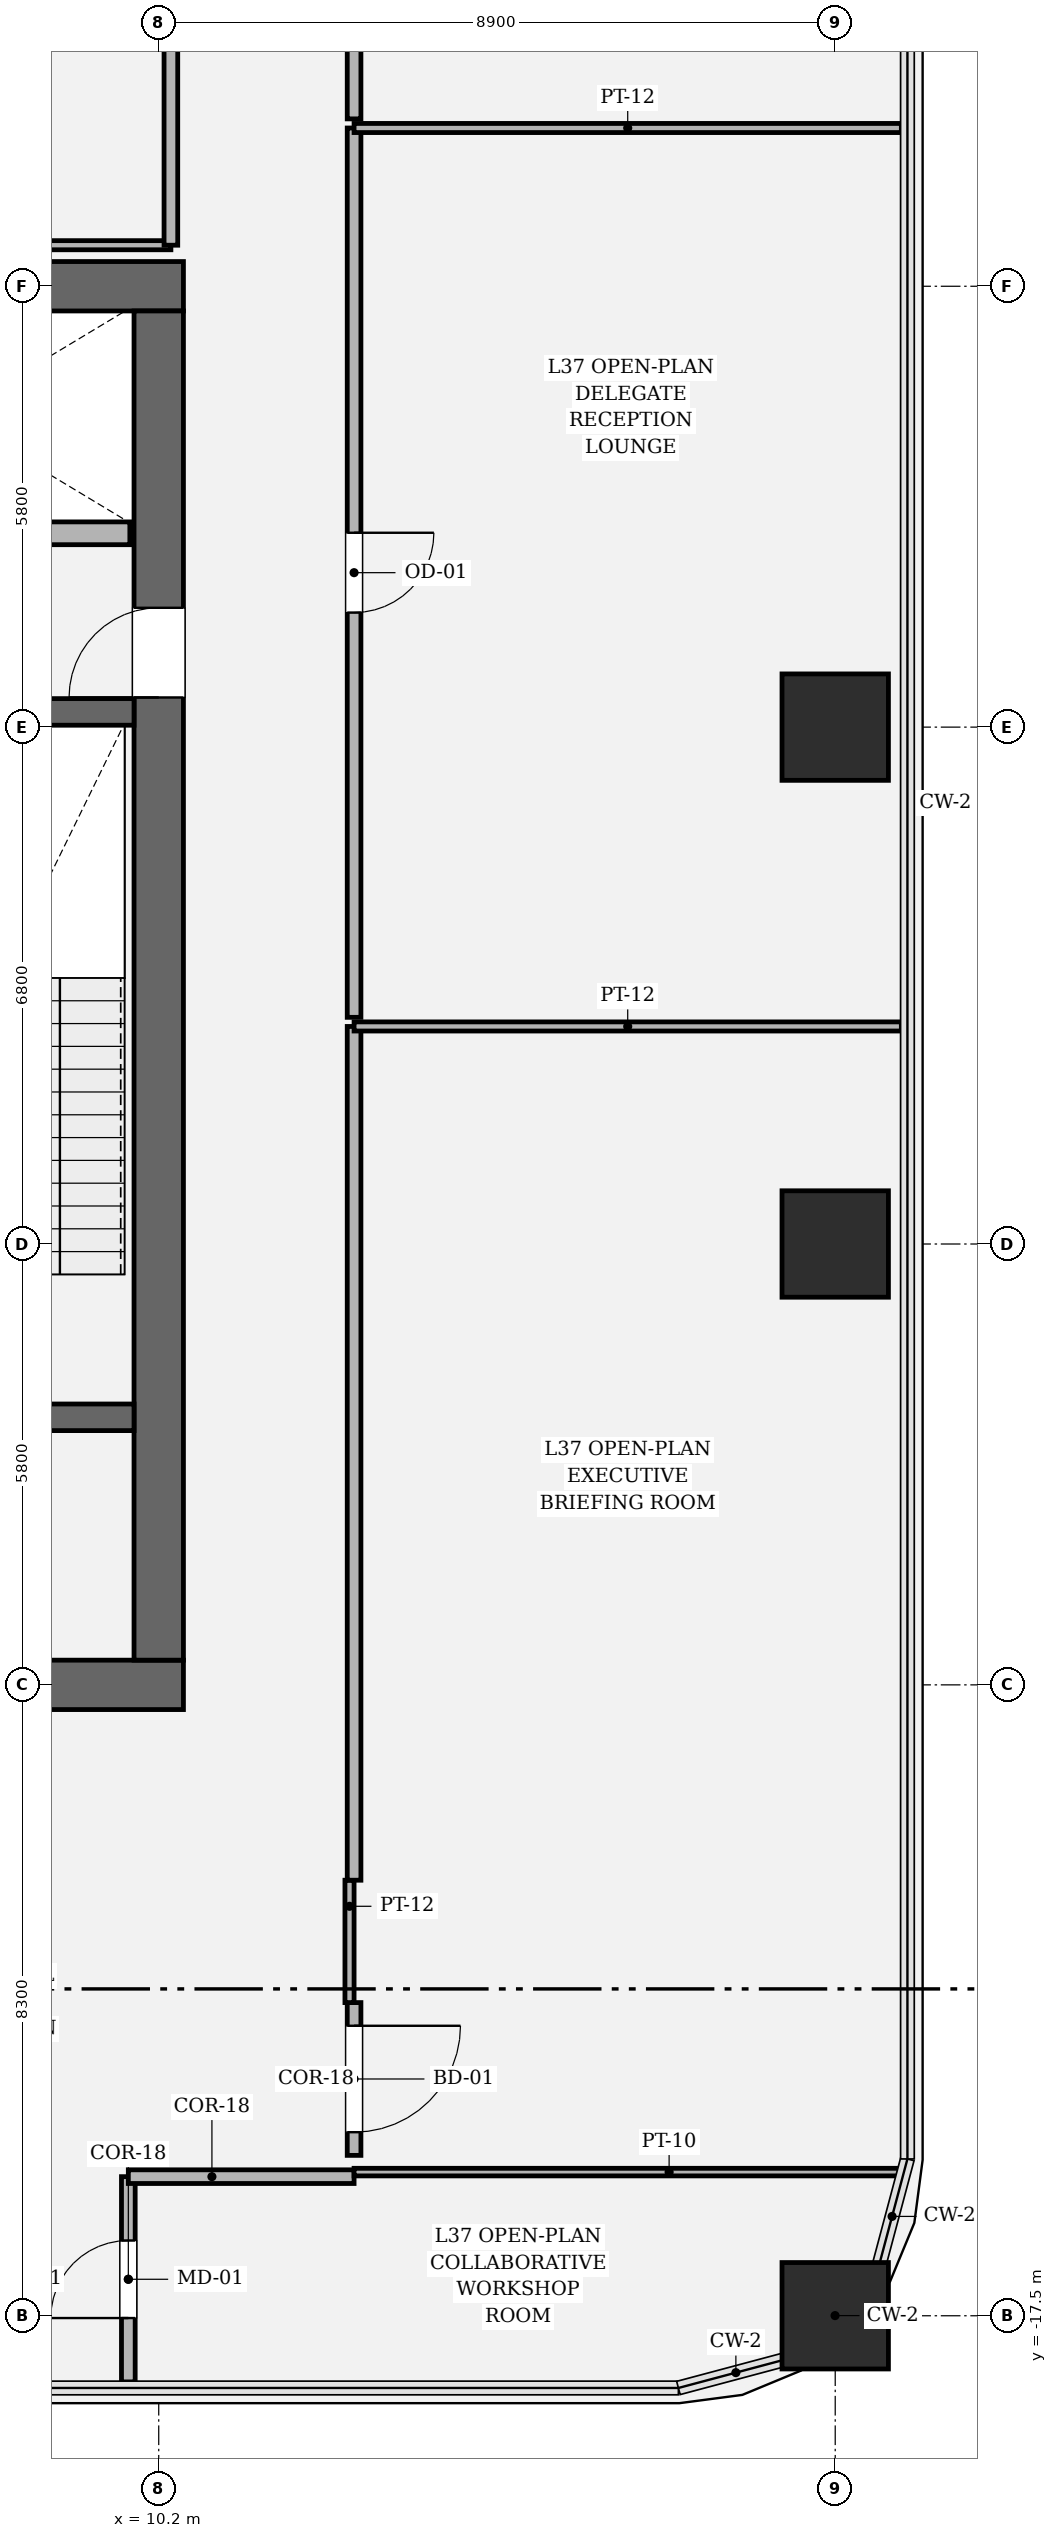
"""IFC4 building model, lengths in metres.
Left out: names, types, materials, properties, quantities, classifications, styles, units other than length and angle.
Written with IfcOpenShell. Run it as: python <this file> out.ifc"""

import sys

from ifc_helpers import new_model, si_unit, direction, frame, frame_2d, origin, origin_2d, place, context, subcontext, project, spatial, rectangle, hollow_rectangle, extrude, element, fill, save


model = new_model("IFC4")
c1 = context("Model", 3, precision=1e-05, world=origin(), true_north=direction((0.0, 1.0)))
c2 = subcontext(c1, "Body", "Model", "MODEL_VIEW")
j1 = project(units=[si_unit("LENGTHUNIT", "METRE"), si_unit("PLANEANGLEUNIT", "RADIAN")], contexts=[c1])
p1 = place(None, origin())
s1 = spatial("IfcSite", under=j1, at=p1, CompositionType="ELEMENT")
p2 = place(p1, origin())
s2 = spatial("IfcBuilding", under=s1, at=p2, CompositionType="ELEMENT")
p3 = place(p2, frame((0.0, 0.0, 160.05)))
s3 = spatial("IfcBuildingStorey", under=s2, at=p3, CompositionType="ELEMENT", Elevation=160.05)
p4 = place(p3, frame((10.525, -9.2, 0.0), z_axis=(0.0, 0.0, 1.0), x_axis=(-1.0, 0.0, 0.0)))
e1 = element("IfcWall", 1, at=p4, inside=s3, PredefinedType="SHEAR", context=c2, shape_type="SweptSolid", body=[
    extrude(rectangle(XDim=21.05, YDim=0.65, at=frame_2d((10.525, 0.0))), origin(), (0.0, 0.0, 1.0), 4.05),
])
p5 = place(p4, frame((2.8, 0.0, 0.0)))
e2 = element("IfcOpeningElement", 2, at=p5, cuts=e1, PredefinedType="OPENING", context=c2, shape_type="SweptSolid", body=[
    extrude(rectangle(XDim=1.25, YDim=2.25, at=frame_2d((0.625, 1.125))), frame((0.0, 0.335, 0.0), z_axis=(0.0, -1.0, 0.0), x_axis=(1.0, 0.0, 0.0)), (0.0, 0.0, 1.0), 0.67),
])
p6 = place(p4, frame((17.0, 0.0, 0.0)))
e3 = element("IfcOpeningElement", 3, at=p6, cuts=e1, PredefinedType="OPENING", context=c2, shape_type="SweptSolid", body=[
    extrude(rectangle(XDim=1.25, YDim=2.25, at=frame_2d((0.625, 1.125))), frame((0.0, 0.335, 0.0), z_axis=(0.0, -1.0, 0.0), x_axis=(1.0, 0.0, 0.0)), (0.0, 0.0, 1.0), 0.67),
])
p7 = place(p3, frame((-10.525, 9.2, 0.0), z_axis=(0.0, 0.0, 1.0), x_axis=(1.0, 0.0, 0.0)))
e4 = element("IfcWall", 4, at=p7, inside=s3, PredefinedType="SHEAR", context=c2, shape_type="SweptSolid", body=[
    extrude(rectangle(XDim=21.05, YDim=0.65, at=frame_2d((10.525, 0.0))), origin(), (0.0, 0.0, 1.0), 4.05),
])
p8 = place(p3, frame((10.2, 8.875, 0.0), z_axis=(0.0, 0.0, 1.0), x_axis=(0.0, -1.0, 0.0)))
e5 = element("IfcWall", 5, at=p8, inside=s3, PredefinedType="SHEAR", context=c2, shape_type="SweptSolid", body=[
    extrude(rectangle(XDim=17.75, YDim=0.65, at=frame_2d((8.875, 0.0))), origin(), (0.0, 0.0, 1.0), 4.05),
])
p9 = place(p8, frame((3.905, 0.0, 0.0)))
e6 = element("IfcOpeningElement", 6, at=p9, cuts=e5, PredefinedType="OPENING", context=c2, shape_type="SweptSolid", body=[
    extrude(rectangle(XDim=1.18, YDim=2.2, at=frame_2d((0.59, 1.1))), frame((0.0, 0.335, 0.0), z_axis=(0.0, -1.0, 0.0), x_axis=(1.0, 0.0, 0.0)), (0.0, 0.0, 1.0), 0.67),
])
p10 = place(p3, frame((4.65, -5.68, 0.0), z_axis=(0.0, 0.0, 1.0), x_axis=(1.0, 0.0, 0.0)))
e7 = element("IfcWall", 7, at=p10, inside=s3, PredefinedType="SOLIDWALL", context=c2, shape_type="SweptSolid", body=[
    extrude(rectangle(XDim=5.225, YDim=0.35, at=frame_2d((2.613, 0.0))), origin(), (0.0, 0.0, 1.0), 4.05),
])
p11 = place(p10, frame((2.71, 0.0, 0.0)))
e8 = element("IfcOpeningElement", 8, at=p11, cuts=e7, PredefinedType="OPENING", context=c2, shape_type="SweptSolid", body=[
    extrude(rectangle(XDim=1.18, YDim=2.2, at=frame_2d((0.59, 1.1))), frame((0.0, 0.185, 0.0), z_axis=(0.0, -1.0, 0.0), x_axis=(1.0, 0.0, 0.0)), (0.0, 0.0, 1.0), 0.37),
])
p12 = place(p3, frame((4.65, 3.6, 0.0), z_axis=(0.0, 0.0, 1.0), x_axis=(1.0, 0.0, 0.0)))
e9 = element("IfcWall", 9, at=p12, inside=s3, PredefinedType="SOLIDWALL", context=c2, shape_type="SweptSolid", body=[
    extrude(rectangle(XDim=5.225, YDim=0.35, at=frame_2d((2.613, 0.0))), origin(), (0.0, 0.0, 1.0), 4.05),
])
for number, where, z_axis, x_axis in (
    (10, (19.1, -17.5, 0.0), (0.0, 0.0, 1.0), (1.0, 0.0, 0.0)),
    (11, (19.1, -3.4, 0.0), (0.0, 0.0, 1.0), (1.0, 0.0, 0.0)),
    (12, (19.1, 3.4, 0.0), (0.0, 0.0, 1.0), (1.0, 0.0, 0.0)),
):
    element("IfcColumn", number, at=place(p3, frame(where, z_axis=z_axis, x_axis=x_axis)), inside=s3, PredefinedType="COLUMN", context=c2, shape_type="SweptSolid", body=[
        extrude(hollow_rectangle(XDim=1.4, YDim=1.4, WallThickness=0.042, at=origin_2d()), origin(), (0.0, 0.0, 1.0), 4.05),
    ])
p13 = place(p3, frame((5.06, 5.95, 0.0), z_axis=(0.0, 0.0, 1.0), x_axis=(1.0, 0.0, 0.0)))
e13 = element("IfcWall", 13, at=p13, inside=s3, PredefinedType="SOLIDWALL", context=c2, shape_type="SweptSolid", body=[
    extrude(rectangle(XDim=4.76, YDim=0.3, at=frame_2d((2.38, 0.0))), origin(), (0.0, 0.0, 1.0), 3.83),
])
p14 = place(p3, frame((9.8, -18.37, 0.0), z_axis=(0.0, 0.0, 1.0), x_axis=(0.0, 1.0, 0.0)))
e14 = element("IfcWall", 14, at=p14, inside=s3, PredefinedType="PARTITIONING", context=c2, shape_type="SweptSolid", body=[
    extrude(rectangle(XDim=2.7, YDim=0.18, at=frame_2d((1.35, 0.0))), origin(), (0.0, 0.0, 1.0), 3.174),
])
p15 = place(p14, frame((0.84, 0.0, 0.0)))
e15 = element("IfcOpeningElement", 15, at=p15, cuts=e14, PredefinedType="OPENING", context=c2, shape_type="SweptSolid", body=[
    extrude(rectangle(XDim=1.02, YDim=2.2, at=frame_2d((0.51, 1.1))), frame((0.0, 0.1, 0.0), z_axis=(0.0, -1.0, 0.0), x_axis=(1.0, 0.0, 0.0)), (0.0, 0.0, 1.0), 0.2),
])
p16 = place(p3, frame((9.8, -15.67, 0.0), z_axis=(0.0, 0.0, 1.0), x_axis=(1.0, 0.0, 0.0)))
e16 = element("IfcWall", 16, at=p16, inside=s3, PredefinedType="PARTITIONING", context=c2, shape_type="SweptSolid", body=[
    extrude(rectangle(XDim=2.97, YDim=0.18, at=frame_2d((1.485, 0.0))), origin(), (0.0, 0.0, 1.0), 3.174),
])
p17 = place(p3, frame((12.77, -15.61, 0.0), z_axis=(0.0, 0.0, 1.0), x_axis=(1.0, 0.0, 0.0)))
e17 = element("IfcWall", 17, at=p17, inside=s3, PredefinedType="PARTITIONING", context=c2, shape_type="SweptSolid", body=[
    extrude(rectangle(XDim=7.177, YDim=0.1, at=frame_2d((3.588, 0.0))), origin(), (0.0, 0.0, 1.0), 3.174),
])
p18 = place(p3, frame((12.77, -15.39, 0.0), z_axis=(0.0, 0.0, 1.0), x_axis=(0.0, 1.0, 0.0)))
e18 = element("IfcWall", 18, at=p18, inside=s3, PredefinedType="PARTITIONING", context=c2, shape_type="SweptSolid", body=[
    extrude(rectangle(XDim=2.01, YDim=0.18, at=frame_2d((1.005, 0.0))), origin(), (0.0, 0.0, 1.0), 3.424),
])
p19 = place(p18, frame((0.305, 0.0, 0.0)))
e19 = element("IfcOpeningElement", 19, at=p19, cuts=e18, PredefinedType="OPENING", context=c2, shape_type="SweptSolid", body=[
    extrude(rectangle(XDim=1.4, YDim=2.25, at=frame_2d((0.7, 1.125))), frame((0.0, 0.1, 0.0), z_axis=(0.0, -1.0, 0.0), x_axis=(1.0, 0.0, 0.0)), (0.0, 0.0, 1.0), 0.2),
])
p20 = place(p3, frame((12.71, -13.38, 0.0), z_axis=(0.0, 0.0, 1.0), x_axis=(0.0, 1.0, 0.0)))
e20 = element("IfcWall", 20, at=p20, inside=s3, PredefinedType="PARTITIONING", context=c2, shape_type="SweptSolid", body=[
    extrude(rectangle(XDim=1.61, YDim=0.12, at=frame_2d((0.805, 0.0))), origin(), (0.0, 0.0, 1.0), 3.424),
])
p21 = place(p3, frame((12.77, -11.77, 0.0), z_axis=(0.0, 0.0, 1.0), x_axis=(0.0, 1.0, 0.0)))
e21 = element("IfcWall", 21, at=p21, inside=s3, PredefinedType="PARTITIONING", context=c2, shape_type="SweptSolid", body=[
    extrude(rectangle(XDim=11.232, YDim=0.18, at=frame_2d((5.616, 0.0))), origin(), (0.0, 0.0, 1.0), 3.174),
])
p22 = place(p3, frame((12.77, -0.538, 0.0), z_axis=(0.0, 0.0, 1.0), x_axis=(1.0, 0.0, 0.0)))
e22 = element("IfcWall", 22, at=p22, inside=s3, PredefinedType="PARTITIONING", context=c2, shape_type="SweptSolid", body=[
    extrude(rectangle(XDim=7.2, YDim=0.12, at=frame_2d((3.6, 0.0))), origin(), (0.0, 0.0, 1.0), 3.174),
])
p23 = place(p3, frame((12.77, -0.418, 0.0), z_axis=(0.0, 0.0, 1.0), x_axis=(0.0, 1.0, 0.0)))
e23 = element("IfcWall", 23, at=p23, inside=s3, PredefinedType="PARTITIONING", context=c2, shape_type="SweptSolid", body=[
    extrude(rectangle(XDim=11.7, YDim=0.18, at=frame_2d((5.85, 0.0))), origin(), (0.0, 0.0, 1.0), 3.174),
])
p24 = place(p23, frame((5.325, 0.0, 0.0)))
e24 = element("IfcOpeningElement", 24, at=p24, cuts=e23, PredefinedType="OPENING", context=c2, shape_type="SweptSolid", body=[
    extrude(rectangle(XDim=1.05, YDim=2.2, at=frame_2d((0.525, 1.1))), frame((0.0, 0.1, 0.0), z_axis=(0.0, -1.0, 0.0), x_axis=(1.0, 0.0, 0.0)), (0.0, 0.0, 1.0), 0.2),
])
p25 = place(p3, frame((12.77, 11.282, 0.0), z_axis=(0.0, 0.0, 1.0), x_axis=(1.0, 0.0, 0.0)))
e25 = element("IfcWall", 25, at=p25, inside=s3, PredefinedType="PARTITIONING", context=c2, shape_type="SweptSolid", body=[
    extrude(rectangle(XDim=7.2, YDim=0.12, at=frame_2d((3.6, 0.0))), origin(), (0.0, 0.0, 1.0), 3.174),
])
p26 = place(p3, frame((10.36, 9.74, 0.0), z_axis=(0.0, 0.0, 1.0), x_axis=(-1.0, 0.0, 0.0)))
e26 = element("IfcWall", 26, at=p26, inside=s3, PredefinedType="PARTITIONING", context=c2, shape_type="SweptSolid", body=[
    extrude(rectangle(XDim=7.366, YDim=0.12, at=frame_2d((3.683, 0.0))), origin(), (0.0, 0.0, 1.0), 3.174),
])
p27 = place(p3, frame((10.36, 23.17, 0.0), z_axis=(0.0, 0.0, 1.0), x_axis=(0.0, -1.0, 0.0)))
e27 = element("IfcWall", 27, at=p27, inside=s3, PredefinedType="PARTITIONING", context=c2, shape_type="SweptSolid", body=[
    extrude(rectangle(XDim=13.43, YDim=0.18, at=frame_2d((6.715, 0.0))), origin(), (0.0, 0.0, 1.0), 2.544),
])
p28 = place(p27, frame((6.015, 0.0, 0.0)))
e28 = element("IfcOpeningElement", 28, at=p28, cuts=e27, PredefinedType="OPENING", context=c2, shape_type="SweptSolid", body=[
    extrude(rectangle(XDim=1.4, YDim=2.25, at=frame_2d((0.7, 1.125))), frame((0.0, 0.1, 0.0), z_axis=(0.0, -1.0, 0.0), x_axis=(1.0, 0.0, 0.0)), (0.0, 0.0, 1.0), 0.2),
])
p29 = place(p3, frame((12.77, 11.402, 0.0), z_axis=(0.0, 0.0, 1.0), x_axis=(0.0, 1.0, 0.0)))
e29 = element("IfcWall", 29, at=p29, inside=s3, PredefinedType="PARTITIONING", context=c2, shape_type="SweptSolid", body=[
    extrude(rectangle(XDim=11.768, YDim=0.18, at=frame_2d((5.884, 0.0))), origin(), (0.0, 0.0, 1.0), 2.544),
])
p30 = place(p29, frame((5.184, 0.0, 0.0)))
e30 = element("IfcOpeningElement", 30, at=p30, cuts=e29, PredefinedType="OPENING", context=c2, shape_type="SweptSolid", body=[
    extrude(rectangle(XDim=1.4, YDim=2.25, at=frame_2d((0.7, 1.125))), frame((0.0, 0.1, 0.0), z_axis=(0.0, -1.0, 0.0), x_axis=(1.0, 0.0, 0.0)), (0.0, 0.0, 1.0), 0.2),
])
p31 = place(p9, origin())
e31 = element("IfcDoor", 31, at=p31, inside=s3, OperationType="SINGLE_SWING_RIGHT", PredefinedType="DOOR", context=c2, shape_type="SweptSolid", body=[
    extrude(rectangle(XDim=1.18, YDim=2.2, at=frame_2d((0.59, 1.1))), frame((0.0, 0.025, 0.0), z_axis=(0.0, -1.0, 0.0), x_axis=(1.0, 0.0, 0.0)), (0.0, 0.0, 1.0), 0.05),
])
fill(e6, e31)
p32 = place(p15, origin())
e32 = element("IfcDoor", 32, at=p32, inside=s3, OperationType="SINGLE_SWING_LEFT", PredefinedType="DOOR", context=c2, shape_type="SweptSolid", body=[
    extrude(rectangle(XDim=1.02, YDim=2.2, at=frame_2d((0.51, 1.1))), frame((0.0, 0.025, 0.0), z_axis=(0.0, -1.0, 0.0), x_axis=(1.0, 0.0, 0.0)), (0.0, 0.0, 1.0), 0.05),
])
fill(e15, e32)
p33 = place(p19, origin())
e33 = element("IfcDoor", 33, at=p33, inside=s3, OperationType="SINGLE_SWING_RIGHT", PredefinedType="DOOR", context=c2, shape_type="SweptSolid", body=[
    extrude(rectangle(XDim=1.4, YDim=2.25, at=frame_2d((0.7, 1.125))), frame((0.0, 0.025, 0.0), z_axis=(0.0, -1.0, 0.0), x_axis=(1.0, 0.0, 0.0)), (0.0, 0.0, 1.0), 0.05),
])
fill(e19, e33)
p34 = place(p24, origin())
e34 = element("IfcDoor", 34, at=p34, inside=s3, OperationType="SINGLE_SWING_RIGHT", PredefinedType="DOOR", context=c2, shape_type="SweptSolid", body=[
    extrude(rectangle(XDim=1.05, YDim=2.2, at=frame_2d((0.525, 1.1))), frame((0.0, 0.025, 0.0), z_axis=(0.0, -1.0, 0.0), x_axis=(1.0, 0.0, 0.0)), (0.0, 0.0, 1.0), 0.05),
])
fill(e24, e34)
save(model, sys.argv[1])
